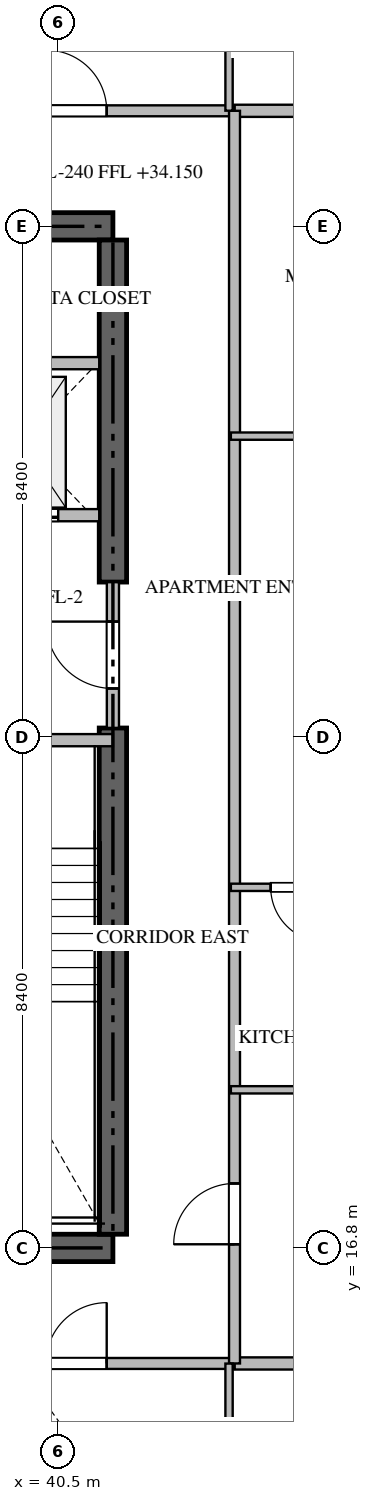
"""IFC4 building model, lengths in metres.
Left out: names, types, materials, properties, quantities, classifications, styles, units other than length and angle.
Written with IfcOpenShell. Run it as: python <this file> out.ifc"""

import sys

from ifc_helpers import new_model, si_unit, direction, frame, frame_2d, origin, place, context, subcontext, project, spatial, rectangle, extrude, source, transform, mapped, element, fill, save


model = new_model("IFC4")
c1 = context("Model", 3, precision=1e-05, world=origin(), true_north=direction((0.0, 1.0)))
c2 = subcontext(c1, "Body", "Model", "MODEL_VIEW")
j1 = project(units=[si_unit("LENGTHUNIT", "METRE"), si_unit("PLANEANGLEUNIT", "RADIAN")], contexts=[c1])
p1 = place(None, origin())
s1 = spatial("IfcSite", under=j1, at=p1, CompositionType="ELEMENT")
p2 = place(p1, origin())
s2 = spatial("IfcBuilding", under=s1, at=p2, CompositionType="ELEMENT")
p3 = place(p2, frame((0.0, 0.0, 34.2)))
s3 = spatial("IfcBuildingStorey", under=s2, at=p3, CompositionType="ELEMENT", Elevation=34.2)
for number, where, z_axis, x_axis in (
    (1, (23.4, 16.8, -0.26), (0.0, 0.0, 1.0), (1.0, 0.0, 0.0)),
    (2, (41.4, 33.6, -0.26), (0.0, 0.0, 1.0), (-1.0, 0.0, 0.0)),
):
    element("IfcWall", number, at=place(p3, frame(where, z_axis=z_axis, x_axis=x_axis)), inside=s3, PredefinedType="SHEAR", context=c2, shape_type="SweptSolid", body=[
        extrude(rectangle(XDim=18.0, YDim=0.45, at=frame_2d((9.0, 0.0))), origin(), (0.0, 0.0, 1.0), 3.748),
    ])
p4 = place(p3, frame((41.4, 17.025, -0.26), z_axis=(0.0, 0.0, 1.0), x_axis=(0.0, 1.0, 0.0)))
e3 = element("IfcWall", 3, at=p4, inside=s3, PredefinedType="SHEAR", context=c2, shape_type="SweptSolid", body=[
    extrude(rectangle(XDim=8.325, YDim=0.45, at=frame_2d((4.163, 0.0))), origin(), (0.0, 0.0, 1.0), 3.748),
])
p5 = place(p3, frame((41.4, 27.75, -0.26), z_axis=(0.0, 0.0, 1.0), x_axis=(0.0, 1.0, 0.0)))
e4 = element("IfcWall", 4, at=p5, inside=s3, PredefinedType="SHEAR", context=c2, shape_type="SweptSolid", body=[
    extrude(rectangle(XDim=5.625, YDim=0.45, at=frame_2d((2.812, 0.0))), origin(), (0.0, 0.0, 1.0), 3.748),
])
p6 = place(p3, frame((36.95, 25.15, 0.0), z_axis=(0.0, 0.0, 1.0), x_axis=(1.0, 0.0, 0.0)))
e5 = element("IfcWall", 5, at=p6, inside=s3, PredefinedType="STANDARD", context=c2, shape_type="SweptSolid", body=[
    extrude(rectangle(XDim=4.45, YDim=0.2, at=frame_2d((2.225, 0.0))), origin(), (0.0, 0.0, 1.0), 3.49),
])
p7 = place(p6, frame((1.65, 0.0, 0.0)))
e6 = element("IfcOpeningElement", 6, at=p7, cuts=e5, PredefinedType="OPENING", context=c2, shape_type="SweptSolid", body=[
    extrude(rectangle(XDim=1.1, YDim=2.15, at=frame_2d((0.55, 1.075))), frame((0.0, 0.11, 0.0), z_axis=(0.0, -1.0, 0.0), x_axis=(1.0, 0.0, 0.0)), (0.0, 0.0, 1.0), 0.22),
])
p8 = place(p3, frame((38.75, 28.85, 0.0), z_axis=(0.0, 0.0, 1.0), x_axis=(1.0, 0.0, 0.0)))
e7 = element("IfcWall", 7, at=p8, inside=s3, PredefinedType="STANDARD", context=c2, shape_type="SweptSolid", body=[
    extrude(rectangle(XDim=2.425, YDim=0.2, at=frame_2d((1.212, 0.0))), origin(), (0.0, 0.0, 1.0), 3.49),
])
p9 = place(p8, frame((0.55, 0.0, 0.0)))
e8 = element("IfcOpeningElement", 8, at=p9, cuts=e7, PredefinedType="OPENING", context=c2, shape_type="SweptSolid", body=[
    extrude(rectangle(XDim=1.2, YDim=2.2, at=frame_2d((0.6, 1.1))), frame((0.0, 0.11, 0.0), z_axis=(0.0, -1.0, 0.0), x_axis=(1.0, 0.0, 0.0)), (0.0, 0.0, 1.0), 0.22),
])
p10 = place(p3, frame((38.75, 31.35, 0.0), z_axis=(0.0, 0.0, 1.0), x_axis=(1.0, 0.0, 0.0)))
e9 = element("IfcWall", 9, at=p10, inside=s3, PredefinedType="STANDARD", context=c2, shape_type="SweptSolid", body=[
    extrude(rectangle(XDim=2.425, YDim=0.2, at=frame_2d((1.212, 0.0))), origin(), (0.0, 0.0, 1.0), 3.49),
])
p11 = place(p3, frame((41.4, 25.352, 0.0), z_axis=(0.0, 0.0, 1.0), x_axis=(0.0, 1.0, 0.0)))
e10 = element("IfcWall", 10, at=p11, inside=s3, PredefinedType="STANDARD", context=c2, shape_type="SweptSolid", body=[
    extrude(rectangle(XDim=2.396, YDim=0.2, at=frame_2d((1.198, 0.0))), origin(), (0.0, 0.0, 1.0), 3.49),
])
p12 = place(p11, frame((0.648, 0.0, 0.0)))
e11 = element("IfcOpeningElement", 11, at=p12, cuts=e10, PredefinedType="OPENING", context=c2, shape_type="SweptSolid", body=[
    extrude(rectangle(XDim=1.1, YDim=2.15, at=frame_2d((0.55, 1.075))), frame((0.0, 0.11, 0.0), z_axis=(0.0, -1.0, 0.0), x_axis=(1.0, 0.0, 0.0)), (0.0, 0.0, 1.0), 0.22),
])
for number, where, z_axis, x_axis in (
    (12, (43.4, 14.9, 0.0), (0.0, 0.0, 1.0), (1.0, 0.0, 0.0)),
    (13, (43.4, 35.5, 0.0), (0.0, 0.0, 1.0), (1.0, 0.0, 0.0)),
):
    element("IfcWall", number, at=place(p3, frame(where, z_axis=z_axis, x_axis=x_axis)), inside=s3, PredefinedType="PARTITIONING", context=c2, shape_type="SweptSolid", body=[
        extrude(rectangle(XDim=15.318, YDim=0.2, at=frame_2d((7.659, 0.0))), origin(), (0.0, 0.0, 1.0), 3.49),
    ])
p13 = place(p3, frame((21.402, 14.9, 0.0), z_axis=(0.0, 0.0, 1.0), x_axis=(1.0, 0.0, 0.0)))
e14 = element("IfcWall", 14, at=p13, inside=s3, PredefinedType="PARTITIONING", context=c2, shape_type="SweptSolid", body=[
    extrude(rectangle(XDim=21.996, YDim=0.18, at=frame_2d((10.998, 0.0))), origin(), (0.0, 0.0, 1.0), 3.49),
])
p14 = place(p13, frame((2.1, 0.0, 0.0)))
e15 = element("IfcOpeningElement", 15, at=p14, cuts=e14, PredefinedType="OPENING", context=c2, shape_type="SweptSolid", body=[
    extrude(rectangle(XDim=1.0, YDim=2.15, at=frame_2d((0.5, 1.075))), frame((0.0, 0.1, 0.0), z_axis=(0.0, -1.0, 0.0), x_axis=(1.0, 0.0, 0.0)), (0.0, 0.0, 1.0), 0.2),
])
p15 = place(p13, frame((6.719, 0.0, 0.0)))
e16 = element("IfcOpeningElement", 16, at=p15, cuts=e14, PredefinedType="OPENING", context=c2, shape_type="SweptSolid", body=[
    extrude(rectangle(XDim=1.0, YDim=2.15, at=frame_2d((0.5, 1.075))), frame((0.0, 0.1, 0.0), z_axis=(0.0, -1.0, 0.0), x_axis=(1.0, 0.0, 0.0)), (0.0, 0.0, 1.0), 0.2),
])
p16 = place(p13, frame((18.896, 0.0, 0.0)))
e17 = element("IfcOpeningElement", 17, at=p16, cuts=e14, PredefinedType="OPENING", context=c2, shape_type="SweptSolid", body=[
    extrude(rectangle(XDim=1.0, YDim=2.15, at=frame_2d((0.5, 1.075))), frame((0.0, 0.1, 0.0), z_axis=(0.0, -1.0, 0.0), x_axis=(1.0, 0.0, 0.0)), (0.0, 0.0, 1.0), 0.2),
])
p17 = place(p3, frame((21.402, 35.5, 0.0), z_axis=(0.0, 0.0, 1.0), x_axis=(1.0, 0.0, 0.0)))
e18 = element("IfcWall", 18, at=p17, inside=s3, PredefinedType="PARTITIONING", context=c2, shape_type="SweptSolid", body=[
    extrude(rectangle(XDim=21.996, YDim=0.18, at=frame_2d((10.998, 0.0))), origin(), (0.0, 0.0, 1.0), 3.49),
])
p18 = place(p17, frame((2.1, 0.0, 0.0)))
e19 = element("IfcOpeningElement", 19, at=p18, cuts=e18, PredefinedType="OPENING", context=c2, shape_type="SweptSolid", body=[
    extrude(rectangle(XDim=1.0, YDim=2.15, at=frame_2d((0.5, 1.075))), frame((0.0, 0.1, 0.0), z_axis=(0.0, -1.0, 0.0), x_axis=(1.0, 0.0, 0.0)), (0.0, 0.0, 1.0), 0.2),
])
p19 = place(p17, frame((14.277, 0.0, 0.0)))
e20 = element("IfcOpeningElement", 20, at=p19, cuts=e18, PredefinedType="OPENING", context=c2, shape_type="SweptSolid", body=[
    extrude(rectangle(XDim=1.0, YDim=2.15, at=frame_2d((0.5, 1.075))), frame((0.0, 0.1, 0.0), z_axis=(0.0, -1.0, 0.0), x_axis=(1.0, 0.0, 0.0)), (0.0, 0.0, 1.0), 0.2),
])
p20 = place(p17, frame((18.896, 0.0, 0.0)))
e21 = element("IfcOpeningElement", 21, at=p20, cuts=e18, PredefinedType="OPENING", context=c2, shape_type="SweptSolid", body=[
    extrude(rectangle(XDim=1.0, YDim=2.15, at=frame_2d((0.5, 1.075))), frame((0.0, 0.1, 0.0), z_axis=(0.0, -1.0, 0.0), x_axis=(1.0, 0.0, 0.0)), (0.0, 0.0, 1.0), 0.2),
])
p21 = place(p3, frame((43.4, 14.9, 0.0), z_axis=(0.0, 0.0, 1.0), x_axis=(0.0, 1.0, 0.0)))
e22 = element("IfcWall", 22, at=p21, inside=s3, PredefinedType="PARTITIONING", context=c2, shape_type="SweptSolid", body=[
    extrude(rectangle(XDim=20.6, YDim=0.18, at=frame_2d((10.3, 0.0))), origin(), (0.0, 0.0, 1.0), 3.49),
])
p22 = place(p21, frame((1.96, 0.0, 0.0)))
e23 = element("IfcOpeningElement", 23, at=p22, cuts=e22, PredefinedType="OPENING", context=c2, shape_type="SweptSolid", body=[
    extrude(rectangle(XDim=1.0, YDim=2.15, at=frame_2d((0.5, 1.075))), frame((0.0, 0.1, 0.0), z_axis=(0.0, -1.0, 0.0), x_axis=(1.0, 0.0, 0.0)), (0.0, 0.0, 1.0), 0.2),
])
for number, where, z_axis, x_axis in (
    (24, (43.31, 12.15, 0.0), (0.0, 0.0, 1.0), (0.0, 1.0, 0.0)),
    (25, (43.31, 38.25, 0.0), (0.0, 0.0, 1.0), (0.0, -1.0, 0.0)),
):
    element("IfcWall", number, at=place(p3, frame(where, z_axis=z_axis, x_axis=x_axis)), inside=s3, PredefinedType="PARTITIONING", context=c2, shape_type="SweptSolid", body=[
        extrude(rectangle(XDim=2.748, YDim=0.12, at=frame_2d((1.374, 0.0))), origin(), (0.0, 0.0, 1.0), 3.49),
    ])
p23 = place(p3, frame((46.15, 19.4, 0.0), z_axis=(0.0, 0.0, 1.0), x_axis=(-1.0, 0.0, 0.0)))
e26 = element("IfcWall", 26, at=p23, inside=s3, PredefinedType="PARTITIONING", context=c2, shape_type="SweptSolid", body=[
    extrude(rectangle(XDim=2.81, YDim=0.12, at=frame_2d((1.405, 0.0))), origin(), (0.0, 0.0, 1.0), 3.49),
])
p24 = place(p3, frame((45.55, 22.73, 0.0), z_axis=(0.0, 0.0, 1.0), x_axis=(-1.0, 0.0, 0.0)))
e27 = element("IfcWall", 27, at=p24, inside=s3, PredefinedType="PARTITIONING", context=c2, shape_type="SweptSolid", body=[
    extrude(rectangle(XDim=2.21, YDim=0.12, at=frame_2d((1.105, 0.0))), origin(), (0.0, 0.0, 1.0), 3.49),
])
p25 = place(p24, frame((0.655, 0.0, 0.0)))
e28 = element("IfcOpeningElement", 28, at=p25, cuts=e27, PredefinedType="OPENING", context=c2, shape_type="SweptSolid", body=[
    extrude(rectangle(XDim=0.9, YDim=2.1, at=frame_2d((0.45, 1.05))), frame((0.0, 0.07, 0.0), z_axis=(0.0, -1.0, 0.0), x_axis=(1.0, 0.0, 0.0)), (0.0, 0.0, 1.0), 0.14),
])
p26 = place(p3, frame((45.548, 30.15, 0.0), z_axis=(0.0, 0.0, 1.0), x_axis=(-1.0, 0.0, 0.0)))
e29 = element("IfcWall", 29, at=p26, inside=s3, PredefinedType="PARTITIONING", context=c2, shape_type="SweptSolid", body=[
    extrude(rectangle(XDim=2.208, YDim=0.12, at=frame_2d((1.104, 0.0))), origin(), (0.0, 0.0, 1.0), 3.49),
])
m1 = source(origin(), c2, "Body", "SweptSolid", [
    extrude(rectangle(XDim=1.2, YDim=2.2, at=frame_2d((0.6, 1.1))), frame((0.0, 0.025, 0.0), z_axis=(0.0, -1.0, 0.0), x_axis=(1.0, 0.0, 0.0)), (0.0, 0.0, 1.0), 0.05),
])
p27 = place(p9, origin())
e30 = element("IfcDoor", 30, at=p27, inside=s3, OperationType="DOUBLE_DOOR_SLIDING", PredefinedType="DOOR", context=c2, shape_type="MappedRepresentation", body=[
    mapped(m1, transform((0.0, 0.0, 0.0), scale=1.0)),
])
fill(e8, e30)
m2 = source(origin(), c2, "Body", "SweptSolid", [
    extrude(rectangle(XDim=1.1, YDim=2.15, at=frame_2d((0.55, 1.075))), frame((0.0, 0.025, 0.0), z_axis=(0.0, -1.0, 0.0), x_axis=(1.0, 0.0, 0.0)), (0.0, 0.0, 1.0), 0.05),
])
p28 = place(p12, origin())
e31 = element("IfcDoor", 31, at=p28, inside=s3, OperationType="SINGLE_SWING_RIGHT", PredefinedType="DOOR", context=c2, shape_type="MappedRepresentation", body=[
    mapped(m2, transform((0.0, 0.0, 0.0), scale=1.0)),
])
fill(e11, e31)
m3 = source(origin(), c2, "Body", "SweptSolid", [
    extrude(rectangle(XDim=1.0, YDim=2.15, at=frame_2d((0.5, 1.075))), frame((0.0, 0.025, 0.0), z_axis=(0.0, -1.0, 0.0), x_axis=(1.0, 0.0, 0.0)), (0.0, 0.0, 1.0), 0.05),
])
p29 = place(p16, origin())
e32 = element("IfcDoor", 32, at=p29, inside=s3, OperationType="SINGLE_SWING_RIGHT", PredefinedType="DOOR", context=c2, shape_type="MappedRepresentation", body=[
    mapped(m3, transform((0.0, 0.0, 0.0), scale=1.0)),
])
fill(e17, e32)
p30 = place(p20, origin())
e33 = element("IfcDoor", 33, at=p30, inside=s3, OperationType="SINGLE_SWING_LEFT", PredefinedType="DOOR", context=c2, shape_type="MappedRepresentation", body=[
    mapped(m3, transform((0.0, 0.0, 0.0), scale=1.0)),
])
fill(e21, e33)
p31 = place(p22, origin())
e34 = element("IfcDoor", 34, at=p31, inside=s3, OperationType="SINGLE_SWING_LEFT", PredefinedType="DOOR", context=c2, shape_type="MappedRepresentation", body=[
    mapped(m3, transform((0.0, 0.0, 0.0), scale=1.0)),
])
fill(e23, e34)
m4 = source(origin(), c2, "Body", "SweptSolid", [
    extrude(rectangle(XDim=0.9, YDim=2.1, at=frame_2d((0.45, 1.05))), frame((0.0, 0.025, 0.0), z_axis=(0.0, -1.0, 0.0), x_axis=(1.0, 0.0, 0.0)), (0.0, 0.0, 1.0), 0.05),
])
p32 = place(p25, origin())
e35 = element("IfcDoor", 35, at=p32, inside=s3, OperationType="SINGLE_SWING_LEFT", PredefinedType="DOOR", context=c2, shape_type="MappedRepresentation", body=[
    mapped(m4, transform((0.0, 0.0, 0.0), scale=1.0)),
])
fill(e28, e35)
save(model, sys.argv[1])
